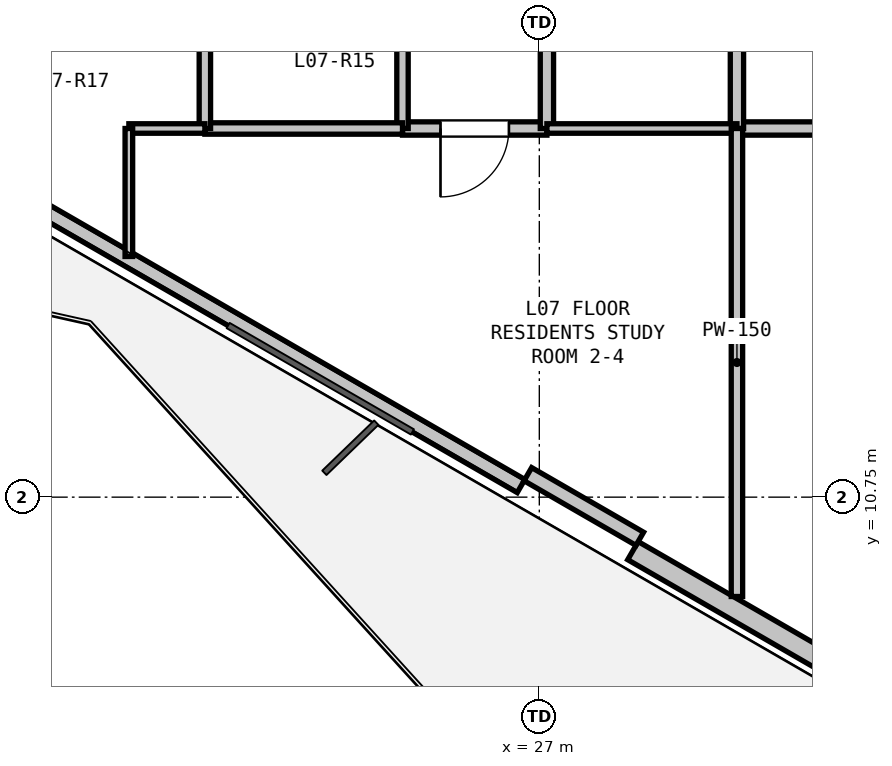
"""IFC4 building model, lengths in metres.
Left out: names, types, materials, properties, quantities, classifications, styles, units other than length and angle.
Written with IfcOpenShell. Run it as: python <this file> out.ifc"""

import sys

from ifc_helpers import new_model, si_unit, direction, frame, frame_2d, origin, place, context, subcontext, project, spatial, rectangle, extrude, element, fill, save


model = new_model("IFC4")
c1 = context("Model", 3, precision=1e-05, world=origin(), true_north=direction((0.0, 1.0)))
c2 = subcontext(c1, "Body", "Model", "MODEL_VIEW")
j1 = project(units=[si_unit("LENGTHUNIT", "METRE"), si_unit("PLANEANGLEUNIT", "RADIAN")], contexts=[c1])
p1 = place(None, origin())
s1 = spatial("IfcSite", under=j1, at=p1, CompositionType="ELEMENT")
p2 = place(p1, origin())
s2 = spatial("IfcBuilding", under=s1, at=p2, CompositionType="ELEMENT")
p3 = place(p2, frame((0.0, 0.0, 29.1)))
s3 = spatial("IfcBuildingStorey", under=s2, at=p3, CompositionType="ELEMENT", Elevation=29.1)
p4 = place(p3, frame((39.207, 3.71, 0.0), z_axis=(0.0, 0.0, 1.0), x_axis=(-0.86603192154, 0.499988710747, 0.0)))
e1 = element("IfcWall", 1, at=p4, inside=s3, PredefinedType="SOLIDWALL", context=c2, shape_type="SweptSolid", body=[
    extrude(rectangle(XDim=12.673, YDim=0.275, at=frame_2d((6.336, 0.0))), origin(), (0.0, 0.0, 1.0), 2.66),
])
p5 = place(p4, frame((8.136, 0.0, 0.0)))
e2 = element("IfcOpeningElement", 2, at=p5, cuts=e1, PredefinedType="OPENING", context=c2, shape_type="SweptSolid", body=[
    extrude(rectangle(XDim=1.0, YDim=2.1, at=frame_2d((0.5, 1.05))), frame((0.0, 0.147, 0.0), z_axis=(0.0, -1.0, 0.0), x_axis=(1.0, 0.0, 0.0)), (0.0, 0.0, 1.0), 0.295),
])
p6 = place(p4, frame((2.216, 0.0, 0.9)))
e3 = element("IfcOpeningElement", 3, at=p6, cuts=e1, PredefinedType="OPENING", context=c2, shape_type="SweptSolid", body=[
    extrude(rectangle(XDim=1.2, YDim=1.4, at=frame_2d((0.6, 0.7))), frame((0.0, 0.147, 0.0), z_axis=(0.0, -1.0, 0.0), x_axis=(1.0, 0.0, 0.0)), (0.0, 0.0, 1.0), 0.295),
])
p7 = place(p3, frame((26.76, 10.896, 0.0), z_axis=(0.0, 0.0, 1.0), x_axis=(-0.866027351828, 0.499996625875, 0.0)))
e4 = element("IfcWall", 4, at=p7, inside=s3, PredefinedType="PARAPET", context=c2, shape_type="SweptSolid", body=[
    extrude(rectangle(XDim=11.973, YDim=0.2, at=frame_2d((5.987, 0.0))), origin(), (0.0, 0.0, 1.0), 0.2),
])
p8 = place(p3, frame((28.322, 10.202, 0.0), z_axis=(0.0, 0.0, 1.0), x_axis=(-0.86605165483, 0.499954529098, 0.0)))
e5 = element("IfcWall", 5, at=p8, inside=s3, PredefinedType="PARAPET", context=c2, shape_type="SweptSolid", body=[
    extrude(rectangle(XDim=1.7, YDim=0.2, at=frame_2d((0.85, 0.0))), origin(), (0.0, 0.0, 1.0), 2.66),
])
p9 = place(p3, frame((27.1, 15.6, 0.0), z_axis=(0.0, 0.0, 1.0), x_axis=(-1.0, 0.0, 0.0)))
e6 = element("IfcWall", 6, at=p9, inside=s3, PredefinedType="PLUMBINGWALL", context=c2, shape_type="SweptSolid", body=[
    extrude(rectangle(XDim=1.9, YDim=0.175, at=frame_2d((0.95, 0.0))), origin(), (0.0, 0.0, 1.0), 2.337),
])
p10 = place(p9, frame((0.5, 0.0, 0.0)))
e7 = element("IfcOpeningElement", 7, at=p10, cuts=e6, PredefinedType="OPENING", context=c2, shape_type="SweptSolid", body=[
    extrude(rectangle(XDim=0.9, YDim=2.1, at=frame_2d((0.45, 1.05))), frame((0.0, 0.097, 0.0), z_axis=(0.0, -1.0, 0.0), x_axis=(1.0, 0.0, 0.0)), (0.0, 0.0, 1.0), 0.195),
])
p11 = place(p3, frame((25.2, 15.6, 0.0), z_axis=(0.0, 0.0, 1.0), x_axis=(0.0, 1.0, 0.0)))
e8 = element("IfcWall", 8, at=p11, inside=s3, PredefinedType="PARTITIONING", context=c2, shape_type="SweptSolid", body=[
    extrude(rectangle(XDim=2.55, YDim=0.15, at=frame_2d((1.275, 0.0))), origin(), (0.0, 0.0, 1.0), 2.337),
])
p12 = place(p3, frame((27.1, 18.15, 0.0), z_axis=(0.0, 0.0, 1.0), x_axis=(0.0, -1.0, 0.0)))
e9 = element("IfcWall", 9, at=p12, inside=s3, PredefinedType="PLUMBINGWALL", context=c2, shape_type="SweptSolid", body=[
    extrude(rectangle(XDim=2.55, YDim=0.175, at=frame_2d((1.275, 0.0))), origin(), (0.0, 0.0, 1.0), 3.04),
])
p13 = place(p3, frame((31.6, 15.6, 0.0), z_axis=(0.0, 0.0, 1.0), x_axis=(-1.0, 0.0, 0.0)))
e10 = element("IfcWall", 10, at=p13, inside=s3, PredefinedType="PLUMBINGWALL", context=c2, shape_type="SweptSolid", body=[
    extrude(rectangle(XDim=2.0, YDim=0.175, at=frame_2d((1.0, 0.0))), origin(), (0.0, 0.0, 1.0), 3.04),
])
p14 = place(p3, frame((29.6, 15.6, 0.0), z_axis=(0.0, 0.0, 1.0), x_axis=(0.0, 1.0, 0.0)))
e11 = element("IfcWall", 11, at=p14, inside=s3, PredefinedType="PLUMBINGWALL", context=c2, shape_type="SweptSolid", body=[
    extrude(rectangle(XDim=2.55, YDim=0.175, at=frame_2d((1.275, 0.0))), origin(), (0.0, 0.0, 1.0), 3.04),
])
p15 = place(p3, frame((25.2, 15.6, 0.0), z_axis=(0.0, 0.0, 1.0), x_axis=(-1.0, 0.0, 0.0)))
e12 = element("IfcWall", 12, at=p15, inside=s3, PredefinedType="PARTITIONING", context=c2, shape_type="SweptSolid", body=[
    extrude(rectangle(XDim=2.6, YDim=0.15, at=frame_2d((1.3, 0.0))), origin(), (0.0, 0.0, 1.0), 3.04),
])
p16 = place(p3, frame((22.6, 15.6, 0.0), z_axis=(0.0, 0.0, 1.0), x_axis=(0.0, 1.0, 0.0)))
e13 = element("IfcWall", 13, at=p16, inside=s3, PredefinedType="PARTITIONING", context=c2, shape_type="SweptSolid", body=[
    extrude(rectangle(XDim=2.55, YDim=0.15, at=frame_2d((1.275, 0.0))), origin(), (0.0, 0.0, 1.0), 3.04),
])
p17 = place(p3, frame((22.6, 15.6, 0.0), z_axis=(0.0, 0.0, 1.0), x_axis=(-1.0, 0.0, 0.0)))
e14 = element("IfcWall", 14, at=p17, inside=s3, PredefinedType="PARTITIONING", context=c2, shape_type="SweptSolid", body=[
    extrude(rectangle(XDim=1.0, YDim=0.125, at=frame_2d((0.5, 0.0))), origin(), (0.0, 0.0, 1.0), 3.04),
])
p18 = place(p3, frame((21.6, 15.6, 0.0), z_axis=(0.0, 0.0, 1.0), x_axis=(0.0, -1.0, 0.0)))
e15 = element("IfcWall", 15, at=p18, inside=s3, PredefinedType="PARTITIONING", context=c2, shape_type="SweptSolid", body=[
    extrude(rectangle(XDim=1.684, YDim=0.1, at=frame_2d((0.842, 0.0))), origin(), (0.0, 0.0, 1.0), 2.365),
])
p19 = place(p3, frame((27.1, 15.6, 0.0), z_axis=(0.0, 0.0, 1.0), x_axis=(1.0, 0.0, 0.0)))
e16 = element("IfcWall", 16, at=p19, inside=s3, PredefinedType="PARTITIONING", context=c2, shape_type="SweptSolid", body=[
    extrude(rectangle(XDim=2.5, YDim=0.125, at=frame_2d((1.25, 0.0))), origin(), (0.0, 0.0, 1.0), 3.04),
])
p20 = place(p3, frame((29.6, 15.6, 0.0), z_axis=(0.0, 0.0, 1.0), x_axis=(0.0, -1.0, 0.0)))
e17 = element("IfcWall", 17, at=p20, inside=s3, PredefinedType="PARTITIONING", context=c2, shape_type="SweptSolid", body=[
    extrude(rectangle(XDim=6.157, YDim=0.15, at=frame_2d((3.079, 0.0))), origin(), (0.0, 0.0, 1.0), 2.337),
])
p21 = place(p10, origin())
e18 = element("IfcDoor", 18, at=p21, inside=s3, OperationType="SINGLE_SWING_RIGHT", PredefinedType="DOOR", context=c2, shape_type="SweptSolid", body=[
    extrude(rectangle(XDim=0.9, YDim=2.1, at=frame_2d((0.45, 1.05))), frame((0.0, 0.025, 0.0), z_axis=(0.0, -1.0, 0.0), x_axis=(1.0, 0.0, 0.0)), (0.0, 0.0, 1.0), 0.05),
])
fill(e7, e18)
save(model, sys.argv[1])
